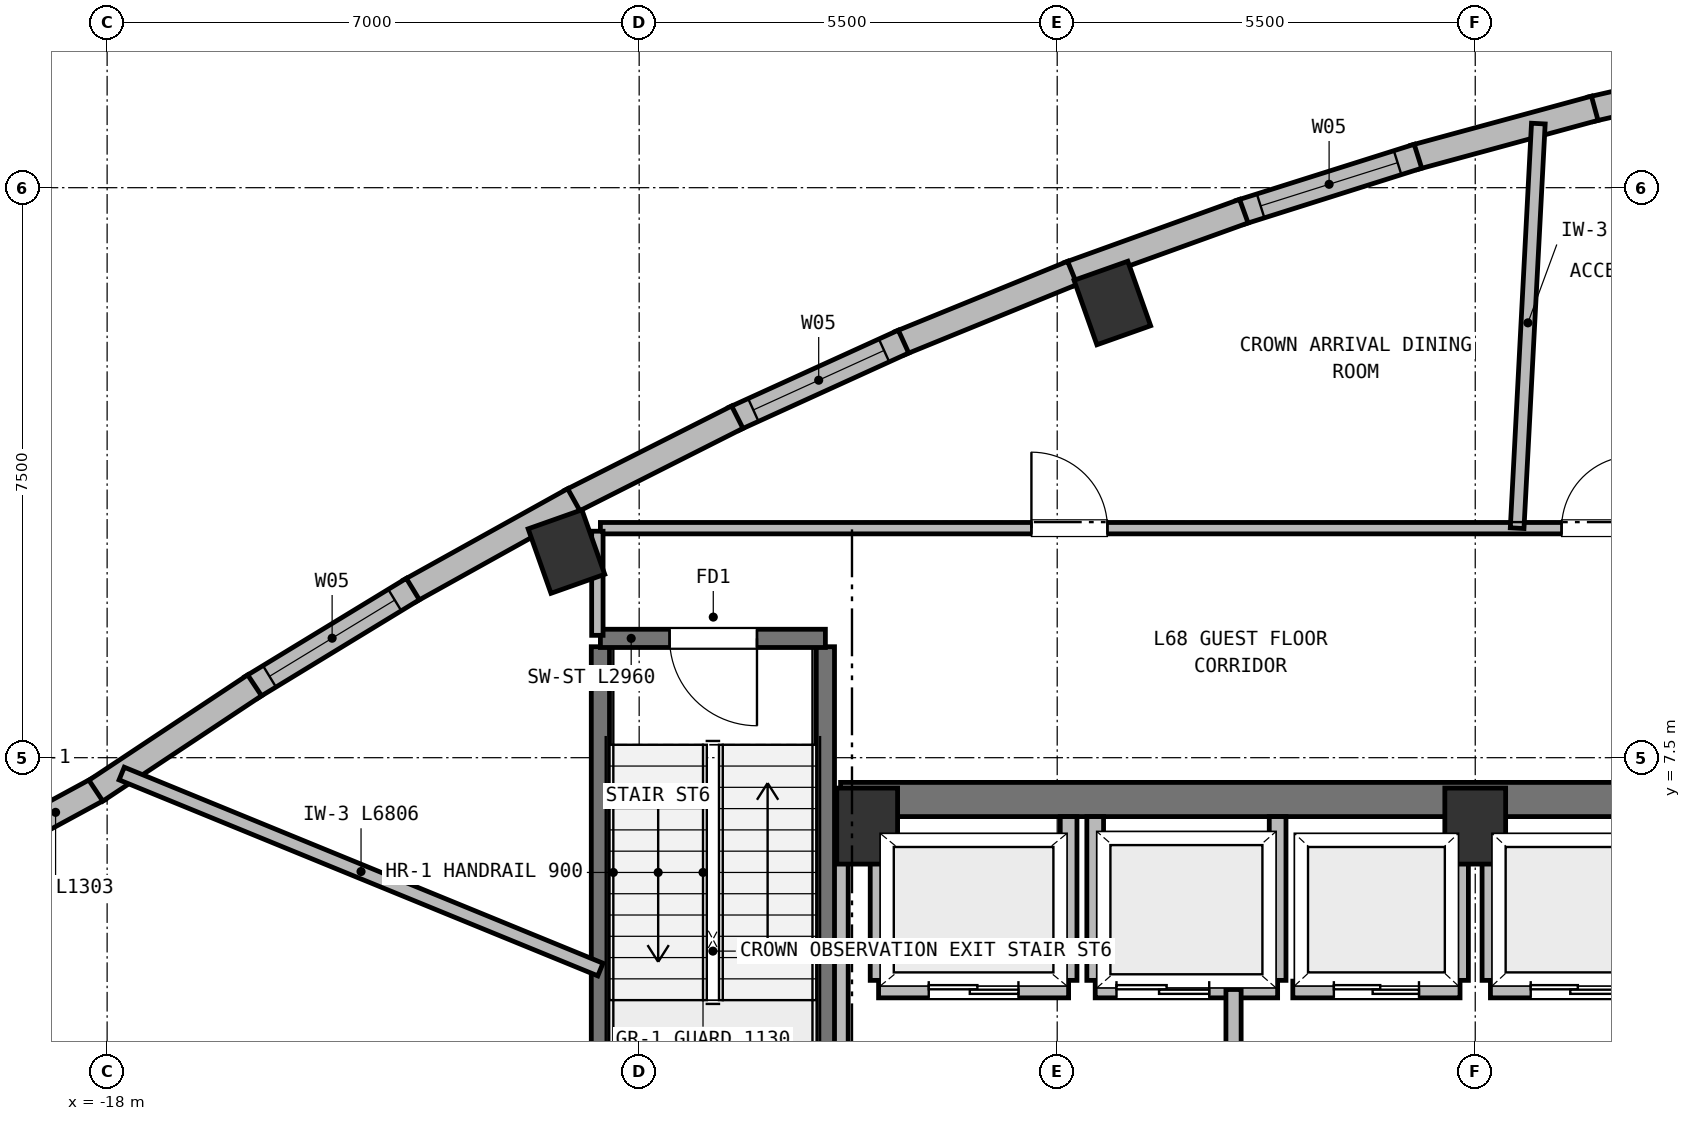
"""IFC4 building model, lengths in metres.
Left out: names, types, materials, properties, quantities, classifications, styles, units other than length and angle.
Written with IfcOpenShell. Run it as: python <this file> out.ifc"""

import sys

from ifc_helpers import new_model, si_unit, direction, frame, frame_2d, origin, origin_2d, place, context, subcontext, project, spatial, rectangle, extrude, element, fill, save


model = new_model("IFC4")
c1 = context("Model", 3, precision=1e-05, world=origin(), true_north=direction((0.0, 1.0)))
c2 = subcontext(c1, "Body", "Model", "MODEL_VIEW")
j1 = project(units=[si_unit("LENGTHUNIT", "METRE"), si_unit("PLANEANGLEUNIT", "RADIAN")], contexts=[c1])
p1 = place(None, origin())
s1 = spatial("IfcSite", under=j1, at=p1, CompositionType="ELEMENT")
p2 = place(p1, origin())
s2 = spatial("IfcBuilding", under=s1, at=p2, CompositionType="ELEMENT")
p3 = place(p2, frame((0.0, 0.0, 272.8)))
s3 = spatial("IfcBuildingStorey", under=s2, at=p3, CompositionType="ELEMENT", Elevation=272.8)
for number, where, z_axis, x_axis in (
    (1, (0.0, 6.6, 0.0), (0.0, 0.0, 1.0), (1.0, 0.0, 0.0)),
    (2, (-8.0, 6.6, 0.0), (0.0, 0.0, 1.0), (1.0, 0.0, 0.0)),
):
    element("IfcColumn", number, at=place(p3, frame(where, z_axis=z_axis, x_axis=x_axis)), inside=s3, PredefinedType="COLUMN", context=c2, shape_type="SweptSolid", body=[
        extrude(rectangle(XDim=0.8, YDim=1.0, at=origin_2d()), origin(), (0.0, 0.0, 1.0), 4.4),
    ])
p4 = place(p3, frame((-8.35, 6.95, 0.0), z_axis=(0.0, 0.0, 1.0), x_axis=(1.0, 0.0, 0.0)))
e3 = element("IfcWall", 3, at=p4, inside=s3, PredefinedType="SHEAR", context=c2, shape_type="SweptSolid", body=[
    extrude(rectangle(XDim=16.7, YDim=0.45, at=frame_2d((8.35, 0.0))), origin(), (0.0, 0.0, 1.0), 4.15),
])
for number, where, z_axis, x_axis in (
    (4, (-4.774, 13.483, 0.0), (0.0, 0.0, 1.0), (0.943, 0.334, 0.0)),
    (5, (-11.957, 10.212, 0.0), (0.0, 0.0, 1.0), (0.943, 0.334, 0.0)),
):
    element("IfcColumn", number, at=place(p3, frame(where, z_axis=z_axis, x_axis=x_axis)), inside=s3, PredefinedType="COLUMN", context=c2, shape_type="SweptSolid", body=[
        extrude(rectangle(XDim=0.75, YDim=0.9, at=origin_2d()), origin(), (0.0, 0.0, 1.0), 4.4),
    ])
p5 = place(p3, frame((-19.25, 6.47, 0.0), z_axis=(0.0, 0.0, 1.0), x_axis=(0.878774855812, 0.477236579478, 0.0)))
e6 = element("IfcWall", 6, at=p5, inside=s3, PredefinedType="SOLIDWALL", context=c2, shape_type="SweptSolid", body=[
    extrude(rectangle(XDim=1.303, YDim=0.33, at=frame_2d((0.651, 0.0))), origin(), (0.0, 0.0, 1.0), 4.15),
])
p6 = place(p3, frame((1.524, 16.033, 0.0), z_axis=(0.0, 0.0, 1.0), x_axis=(0.974681670362, 0.223597051545, 0.0)))
e7 = element("IfcWall", 7, at=p6, inside=s3, PredefinedType="SOLIDWALL", context=c2, shape_type="SweptSolid", body=[
    extrude(rectangle(XDim=2.472, YDim=0.33, at=frame_2d((1.236, 0.0))), origin(), (0.0, 0.0, 1.0), 4.15),
])
p7 = place(p3, frame((-0.802, 15.399, 0.0), z_axis=(0.0, 0.0, 1.0), x_axis=(0.964933096461, 0.262495941596, 0.0)))
e8 = element("IfcWall", 8, at=p7, inside=s3, PredefinedType="SOLIDWALL", context=c2, shape_type="SweptSolid", body=[
    extrude(rectangle(XDim=2.46, YDim=0.33, at=frame_2d((1.23, 0.0))), origin(), (0.0, 0.0, 1.0), 4.15),
])
p8 = place(p3, frame((-3.092, 14.676, 0.0), z_axis=(0.0, 0.0, 1.0), x_axis=(0.953629301066, 0.300983647643, 0.0)))
e9 = element("IfcWall", 9, at=p8, inside=s3, PredefinedType="SOLIDWALL", context=c2, shape_type="SweptSolid", body=[
    extrude(rectangle(XDim=2.452, YDim=0.33, at=frame_2d((1.226, 0.0))), origin(), (0.0, 0.0, 1.0), 4.15),
])
p9 = place(p8, frame((0.281, 0.0, 0.72)))
e10 = element("IfcOpeningElement", 10, at=p9, cuts=e9, PredefinedType="OPENING", context=c2, shape_type="SweptSolid", body=[
    extrude(rectangle(XDim=1.89, YDim=2.15, at=frame_2d((0.945, 1.075))), frame((0.0, 0.175, 0.0), z_axis=(0.0, -1.0, 0.0), x_axis=(1.0, 0.0, 0.0)), (0.0, 0.0, 1.0), 0.35),
])
for number, where, z_axis, x_axis in (
    (11, (-5.347, 13.861, 0.0), (0.0, 0.0, 1.0), (0.941, 0.339, 0.0)),
    (12, (-7.568, 12.955, 0.0), (0.0, 0.0, 1.0), (0.926, 0.377, 0.0)),
):
    element("IfcWall", number, at=place(p3, frame(where, z_axis=z_axis, x_axis=x_axis)), inside=s3, PredefinedType="SOLIDWALL", context=c2, shape_type="SweptSolid", body=[
        extrude(rectangle(XDim=2.448, YDim=0.33, at=frame_2d((1.224, 0.0))), origin(), (0.0, 0.0, 1.0), 4.15),
    ])
p10 = place(p3, frame((-9.754, 11.959, 0.0), z_axis=(0.0, 0.0, 1.0), x_axis=(0.910103748432, 0.414380461763, 0.0)))
e13 = element("IfcWall", 13, at=p10, inside=s3, PredefinedType="SOLIDWALL", context=c2, shape_type="SweptSolid", body=[
    extrude(rectangle(XDim=2.452, YDim=0.33, at=frame_2d((1.226, 0.0))), origin(), (0.0, 0.0, 1.0), 4.15),
])
p11 = place(p10, frame((0.281, 0.0, 0.72)))
e14 = element("IfcOpeningElement", 14, at=p11, cuts=e13, PredefinedType="OPENING", context=c2, shape_type="SweptSolid", body=[
    extrude(rectangle(XDim=1.89, YDim=2.15, at=frame_2d((0.945, 1.075))), frame((0.0, 0.175, 0.0), z_axis=(0.0, -1.0, 0.0), x_axis=(1.0, 0.0, 0.0)), (0.0, 0.0, 1.0), 0.35),
])
p12 = place(p3, frame((-11.905, 10.872, 0.0), z_axis=(0.0, 0.0, 1.0), x_axis=(0.892653761516, 0.450743011096, 0.0)))
e15 = element("IfcWall", 15, at=p12, inside=s3, PredefinedType="SOLIDWALL", context=c2, shape_type="SweptSolid", body=[
    extrude(rectangle(XDim=2.46, YDim=0.33, at=frame_2d((1.23, 0.0))), origin(), (0.0, 0.0, 1.0), 4.15),
])
p13 = place(p3, frame((-14.021, 9.694, 0.0), z_axis=(0.0, 0.0, 1.0), x_axis=(0.873970841772, 0.485978361383, 0.0)))
e16 = element("IfcWall", 16, at=p13, inside=s3, PredefinedType="SOLIDWALL", context=c2, shape_type="SweptSolid", body=[
    extrude(rectangle(XDim=2.472, YDim=0.33, at=frame_2d((1.236, 0.0))), origin(), (0.0, 0.0, 1.0), 4.15),
])
p14 = place(p3, frame((-16.102, 8.425, 0.0), z_axis=(0.0, 0.0, 1.0), x_axis=(0.854079117913, 0.520143115253, 0.0)))
e17 = element("IfcWall", 17, at=p14, inside=s3, PredefinedType="SOLIDWALL", context=c2, shape_type="SweptSolid", body=[
    extrude(rectangle(XDim=2.487, YDim=0.33, at=frame_2d((1.244, 0.0))), origin(), (0.0, 0.0, 1.0), 4.15),
])
p15 = place(p14, frame((0.279, 0.0, 0.72)))
e18 = element("IfcOpeningElement", 18, at=p15, cuts=e17, PredefinedType="OPENING", context=c2, shape_type="SweptSolid", body=[
    extrude(rectangle(XDim=1.93, YDim=2.15, at=frame_2d((0.965, 1.075))), frame((0.0, 0.175, 0.0), z_axis=(0.0, -1.0, 0.0), x_axis=(1.0, 0.0, 0.0)), (0.0, 0.0, 1.0), 0.35),
])
p16 = place(p3, frame((-18.148, 7.066, 0.0), z_axis=(0.0, 0.0, 1.0), x_axis=(0.833157490591, 0.55303579981, 0.0)))
e19 = element("IfcWall", 19, at=p16, inside=s3, PredefinedType="SOLIDWALL", context=c2, shape_type="SweptSolid", body=[
    extrude(rectangle(XDim=2.507, YDim=0.33, at=frame_2d((1.253, 0.0))), origin(), (0.0, 0.0, 1.0), 4.15),
])
p17 = place(p3, frame((-7.85, 4.45, 0.0), z_axis=(0.0, 0.0, 1.0), x_axis=(1.0, 0.0, 0.0)))
e20 = element("IfcWall", 20, at=p17, inside=s3, PredefinedType="PARTITIONING", context=c2, shape_type="SweptSolid", body=[
    extrude(rectangle(XDim=2.5, YDim=0.22, at=frame_2d((1.25, 0.0))), origin(), (0.0, 0.0, 1.0), 4.15),
])
p18 = place(p17, frame((0.66, 0.0, 0.0)))
e21 = element("IfcOpeningElement", 21, at=p18, cuts=e20, PredefinedType="OPENING", context=c2, shape_type="SweptSolid", body=[
    extrude(rectangle(XDim=1.18, YDim=2.15, at=frame_2d((0.59, 1.075))), frame((0.0, 0.12, 0.0), z_axis=(0.0, -1.0, 0.0), x_axis=(1.0, 0.0, 0.0)), (0.0, 0.0, 1.0), 0.24),
])
p19 = place(p3, frame((-7.85, 4.57, 0.0), z_axis=(0.0, 0.0, 1.0), x_axis=(0.0, 1.0, 0.0)))
e22 = element("IfcWall", 22, at=p19, inside=s3, PredefinedType="PARTITIONING", context=c2, shape_type="SweptSolid", body=[
    extrude(rectangle(XDim=2.155, YDim=0.22, at=frame_2d((1.078, 0.0))), origin(), (0.0, 0.0, 1.0), 3.83),
])
p20 = place(p3, frame((-5.35, 4.57, 0.0), z_axis=(0.0, 0.0, 1.0), x_axis=(0.0, 1.0, 0.0)))
e23 = element("IfcWall", 23, at=p20, inside=s3, PredefinedType="PARTITIONING", context=c2, shape_type="SweptSolid", body=[
    extrude(rectangle(XDim=2.155, YDim=0.22, at=frame_2d((1.078, 0.0))), origin(), (0.0, 0.0, 1.0), 4.15),
])
p21 = place(p3, frame((-5.0, 4.45, 0.0), z_axis=(0.0, 0.0, 1.0), x_axis=(1.0, 0.0, 0.0)))
e24 = element("IfcWall", 24, at=p21, inside=s3, PredefinedType="PARTITIONING", context=c2, shape_type="SweptSolid", body=[
    extrude(rectangle(XDim=2.4, YDim=0.22, at=frame_2d((1.2, 0.0))), origin(), (0.0, 0.0, 1.0), 4.15),
])
p22 = place(p21, frame((0.28, 0.0, 0.0)))
e25 = element("IfcOpeningElement", 25, at=p22, cuts=e24, PredefinedType="OPENING", context=c2, shape_type="SweptSolid", body=[
    extrude(rectangle(XDim=1.22, YDim=2.15, at=frame_2d((0.61, 1.075))), frame((0.0, 0.12, 0.0), z_axis=(0.0, -1.0, 0.0), x_axis=(1.0, 0.0, 0.0)), (0.0, 0.0, 1.0), 0.24),
])
for number, where, z_axis, x_axis in (
    (26, (-5.0, 4.57, 0.0), (0.0, 0.0, 1.0), (0.0, 1.0, 0.0)),
    (27, (-2.6, 4.57, 0.0), (0.0, 0.0, 1.0), (0.0, 1.0, 0.0)),
):
    element("IfcWall", number, at=place(p3, frame(where, z_axis=z_axis, x_axis=x_axis)), inside=s3, PredefinedType="PARTITIONING", context=c2, shape_type="SweptSolid", body=[
        extrude(rectangle(XDim=2.155, YDim=0.22, at=frame_2d((1.078, 0.0))), origin(), (0.0, 0.0, 1.0), 4.15),
    ])
p23 = place(p3, frame((-2.4, 4.45, 0.0), z_axis=(0.0, 0.0, 1.0), x_axis=(1.0, 0.0, 0.0)))
e28 = element("IfcWall", 28, at=p23, inside=s3, PredefinedType="PARTITIONING", context=c2, shape_type="SweptSolid", body=[
    extrude(rectangle(XDim=2.2, YDim=0.22, at=frame_2d((1.1, 0.0))), origin(), (0.0, 0.0, 1.0), 4.15),
])
p24 = place(p23, frame((0.54, 0.0, 0.0)))
e29 = element("IfcOpeningElement", 29, at=p24, cuts=e28, PredefinedType="OPENING", context=c2, shape_type="SweptSolid", body=[
    extrude(rectangle(XDim=1.12, YDim=2.15, at=frame_2d((0.56, 1.075))), frame((0.0, 0.12, 0.0), z_axis=(0.0, -1.0, 0.0), x_axis=(1.0, 0.0, 0.0)), (0.0, 0.0, 1.0), 0.24),
])
p25 = place(p3, frame((-0.2, 4.57, 0.0), z_axis=(0.0, 0.0, 1.0), x_axis=(0.0, 1.0, 0.0)))
e30 = element("IfcWall", 30, at=p25, inside=s3, PredefinedType="PARTITIONING", context=c2, shape_type="SweptSolid", body=[
    extrude(rectangle(XDim=2.155, YDim=0.22, at=frame_2d((1.078, 0.0))), origin(), (0.0, 0.0, 1.0), 4.15),
])
p26 = place(p3, frame((0.2, 4.45, 0.0), z_axis=(0.0, 0.0, 1.0), x_axis=(1.0, 0.0, 0.0)))
e31 = element("IfcWall", 31, at=p26, inside=s3, PredefinedType="PARTITIONING", context=c2, shape_type="SweptSolid", body=[
    extrude(rectangle(XDim=2.2, YDim=0.22, at=frame_2d((1.1, 0.0))), origin(), (0.0, 0.0, 1.0), 4.15),
])
p27 = place(p26, frame((0.53, 0.0, 0.0)))
e32 = element("IfcOpeningElement", 32, at=p27, cuts=e31, PredefinedType="OPENING", context=c2, shape_type="SweptSolid", body=[
    extrude(rectangle(XDim=1.14, YDim=2.15, at=frame_2d((0.57, 1.075))), frame((0.0, 0.12, 0.0), z_axis=(0.0, -1.0, 0.0), x_axis=(1.0, 0.0, 0.0)), (0.0, 0.0, 1.0), 0.24),
])
p28 = place(p3, frame((0.2, 4.57, 0.0), z_axis=(0.0, 0.0, 1.0), x_axis=(0.0, 1.0, 0.0)))
e33 = element("IfcWall", 33, at=p28, inside=s3, PredefinedType="PARTITIONING", context=c2, shape_type="SweptSolid", body=[
    extrude(rectangle(XDim=2.155, YDim=0.22, at=frame_2d((1.078, 0.0))), origin(), (0.0, 0.0, 1.0), 4.15),
])
p29 = place(p3, frame((-3.18, 1.15, 0.0), z_axis=(0.0, 0.0, 1.0), x_axis=(0.0, 1.0, 0.0)))
e34 = element("IfcWall", 34, at=p29, inside=s3, PredefinedType="PARTITIONING", context=c2, shape_type="SweptSolid", body=[
    extrude(rectangle(XDim=3.3, YDim=0.2, at=frame_2d((1.65, 0.0))), origin(), (0.0, 0.0, 1.0), 4.15),
])
p30 = place(p29, frame((1.08, 0.0, 0.0)))
e35 = element("IfcOpeningElement", 35, at=p30, cuts=e34, PredefinedType="OPENING", context=c2, shape_type="SweptSolid", body=[
    extrude(rectangle(XDim=1.15, YDim=2.15, at=frame_2d((0.575, 1.075))), frame((0.0, 0.11, 0.0), z_axis=(0.0, -1.0, 0.0), x_axis=(1.0, 0.0, 0.0)), (0.0, 0.0, 1.0), 0.22),
])
p31 = place(p3, frame((-8.35, 1.15, 0.0), z_axis=(0.0, 0.0, 1.0), x_axis=(0.0, 1.0, 0.0)))
e36 = element("IfcWall", 36, at=p31, inside=s3, PredefinedType="PARTITIONING", context=c2, shape_type="SweptSolid", body=[
    extrude(rectangle(XDim=5.4, YDim=0.2, at=frame_2d((2.7, 0.0))), origin(), (0.0, 0.0, 1.0), 4.15),
])
p32 = place(p31, frame((0.06, 0.0, 0.0)))
e37 = element("IfcOpeningElement", 37, at=p32, cuts=e36, PredefinedType="OPENING", context=c2, shape_type="SweptSolid", body=[
    extrude(rectangle(XDim=1.15, YDim=2.15, at=frame_2d((0.575, 1.075))), frame((0.0, 0.11, 0.0), z_axis=(0.0, -1.0, 0.0), x_axis=(1.0, 0.0, 0.0)), (0.0, 0.0, 1.0), 0.22),
])
for number, where, z_axis, x_axis in (
    (38, (-11.51, 2.54, 0.0), (0.0, 0.0, 1.0), (0.0, 1.0, 0.0)),
    (39, (-8.55, 2.54, 0.0), (0.0, 0.0, 1.0), (0.0, 1.0, 0.0)),
):
    element("IfcWall", number, at=place(p3, frame(where, z_axis=z_axis, x_axis=x_axis)), inside=s3, PredefinedType="SHEAR", context=c2, shape_type="SweptSolid", body=[
        extrude(rectangle(XDim=6.42, YDim=0.24, at=frame_2d((3.21, 0.0))), origin(), (0.0, 0.0, 1.0), 4.15),
    ])
p33 = place(p3, frame((-8.55, 9.07, 0.0), z_axis=(0.0, 0.0, 1.0), x_axis=(-1.0, 0.0, 0.0)))
e40 = element("IfcWall", 40, at=p33, inside=s3, PredefinedType="SHEAR", context=c2, shape_type="SweptSolid", body=[
    extrude(rectangle(XDim=2.96, YDim=0.24, at=frame_2d((1.48, 0.0))), origin(), (0.0, 0.0, 1.0), 4.15),
])
p34 = place(p33, frame((0.9, 0.0, 0.0)))
e41 = element("IfcOpeningElement", 41, at=p34, cuts=e40, PredefinedType="OPENING", context=c2, shape_type="SweptSolid", body=[
    extrude(rectangle(XDim=1.15, YDim=2.15, at=frame_2d((0.575, 1.075))), frame((0.0, 0.13, 0.0), z_axis=(0.0, -1.0, 0.0), x_axis=(1.0, 0.0, 0.0)), (0.0, 0.0, 1.0), 0.26),
])
p35 = place(p3, frame((-11.51, 10.52, 0.0), z_axis=(0.0, 0.0, 1.0), x_axis=(1.0, 0.0, 0.0)))
e42 = element("IfcWall", 42, at=p35, inside=s3, PredefinedType="PARTITIONING", context=c2, shape_type="SweptSolid", body=[
    extrude(rectangle(XDim=20.09, YDim=0.15, at=frame_2d((10.045, 0.0))), origin(), (0.0, 0.0, 1.0), 4.15),
])
p36 = place(p35, frame((12.646, 0.0, 0.0)))
e43 = element("IfcOpeningElement", 43, at=p36, cuts=e42, PredefinedType="OPENING", context=c2, shape_type="SweptSolid", body=[
    extrude(rectangle(XDim=0.95, YDim=2.1, at=frame_2d((0.475, 1.05))), frame((0.0, 0.085, 0.0), z_axis=(0.0, -1.0, 0.0), x_axis=(1.0, 0.0, 0.0)), (0.0, 0.0, 1.0), 0.17),
])
p37 = place(p35, frame((14.763, 0.0, 0.0)))
e44 = element("IfcOpeningElement", 44, at=p37, cuts=e42, PredefinedType="OPENING", context=c2, shape_type="SweptSolid", body=[
    extrude(rectangle(XDim=0.95, YDim=2.1, at=frame_2d((0.475, 1.05))), frame((0.0, 0.085, 0.0), z_axis=(0.0, -1.0, 0.0), x_axis=(1.0, 0.0, 0.0)), (0.0, 0.0, 1.0), 0.17),
])
p38 = place(p35, frame((16.895, 0.0, 0.0)))
e45 = element("IfcOpeningElement", 45, at=p38, cuts=e42, PredefinedType="OPENING", context=c2, shape_type="SweptSolid", body=[
    extrude(rectangle(XDim=0.95, YDim=2.1, at=frame_2d((0.475, 1.05))), frame((0.0, 0.085, 0.0), z_axis=(0.0, -1.0, 0.0), x_axis=(1.0, 0.0, 0.0)), (0.0, 0.0, 1.0), 0.17),
])
p39 = place(p35, frame((5.671, 0.0, 0.0)))
e46 = element("IfcOpeningElement", 46, at=p39, cuts=e42, PredefinedType="OPENING", context=c2, shape_type="SweptSolid", body=[
    extrude(rectangle(XDim=1.0, YDim=2.15, at=frame_2d((0.5, 1.075))), frame((0.0, 0.085, 0.0), z_axis=(0.0, -1.0, 0.0), x_axis=(1.0, 0.0, 0.0)), (0.0, 0.0, 1.0), 0.17),
])
p40 = place(p3, frame((-11.55, 9.11, 0.0), z_axis=(0.0, 0.0, 1.0), x_axis=(0.0, 1.0, 0.0)))
e47 = element("IfcWall", 47, at=p40, inside=s3, PredefinedType="PARTITIONING", context=c2, shape_type="SweptSolid", body=[
    extrude(rectangle(XDim=1.37, YDim=0.15, at=frame_2d((0.685, 0.0))), origin(), (0.0, 0.0, 1.0), 4.15),
])
p41 = place(p3, frame((0.551, 10.52, 0.0), z_axis=(0.0, 0.0, 1.0), x_axis=(0.05234969433, 0.998628814677, 0.0)))
e48 = element("IfcWall", 48, at=p41, inside=s3, PredefinedType="PARTITIONING", context=c2, shape_type="SweptSolid", body=[
    extrude(rectangle(XDim=5.331, YDim=0.18, at=frame_2d((2.665, 0.0))), origin(), (0.0, 0.0, 1.0), 4.15),
])
p42 = place(p3, frame((-11.51, 4.712, 0.0), z_axis=(0.0, 0.0, 1.0), x_axis=(-0.925422915291, 0.378935915234, 0.0)))
e49 = element("IfcWall", 49, at=p42, inside=s3, PredefinedType="PARTITIONING", context=c2, shape_type="SweptSolid", body=[
    extrude(rectangle(XDim=6.806, YDim=0.18, at=frame_2d((3.403, 0.0))), origin(), (0.0, 0.0, 1.0), 4.15),
])
p43 = place(p9, origin())
e50 = element("IfcWindow", 50, at=p43, inside=s3, PartitioningType="SINGLE_PANEL", PredefinedType="WINDOW", context=c2, shape_type="SweptSolid", body=[
    extrude(rectangle(XDim=1.89, YDim=2.15, at=frame_2d((0.945, 1.075))), frame((0.0, 0.03, 0.0), z_axis=(0.0, -1.0, 0.0), x_axis=(1.0, 0.0, 0.0)), (0.0, 0.0, 1.0), 0.06),
])
fill(e10, e50)
p44 = place(p11, origin())
e51 = element("IfcWindow", 51, at=p44, inside=s3, PartitioningType="SINGLE_PANEL", PredefinedType="WINDOW", context=c2, shape_type="SweptSolid", body=[
    extrude(rectangle(XDim=1.89, YDim=2.15, at=frame_2d((0.945, 1.075))), frame((0.0, 0.03, 0.0), z_axis=(0.0, -1.0, 0.0), x_axis=(1.0, 0.0, 0.0)), (0.0, 0.0, 1.0), 0.06),
])
fill(e14, e51)
p45 = place(p15, origin())
e52 = element("IfcWindow", 52, at=p45, inside=s3, PartitioningType="SINGLE_PANEL", PredefinedType="WINDOW", context=c2, shape_type="SweptSolid", body=[
    extrude(rectangle(XDim=1.93, YDim=2.15, at=frame_2d((0.965, 1.075))), frame((0.0, 0.03, 0.0), z_axis=(0.0, -1.0, 0.0), x_axis=(1.0, 0.0, 0.0)), (0.0, 0.0, 1.0), 0.06),
])
fill(e18, e52)
p46 = place(p18, origin())
e53 = element("IfcDoor", 53, at=p46, inside=s3, OperationType="DOUBLE_DOOR_SLIDING", PredefinedType="DOOR", context=c2, shape_type="SweptSolid", body=[
    extrude(rectangle(XDim=1.18, YDim=2.15, at=frame_2d((0.59, 1.075))), frame((0.0, 0.025, 0.0), z_axis=(0.0, -1.0, 0.0), x_axis=(1.0, 0.0, 0.0)), (0.0, 0.0, 1.0), 0.05),
])
fill(e21, e53)
p47 = place(p22, origin())
e54 = element("IfcDoor", 54, at=p47, inside=s3, OperationType="DOUBLE_DOOR_SLIDING", PredefinedType="DOOR", context=c2, shape_type="SweptSolid", body=[
    extrude(rectangle(XDim=1.22, YDim=2.15, at=frame_2d((0.61, 1.075))), frame((0.0, 0.025, 0.0), z_axis=(0.0, -1.0, 0.0), x_axis=(1.0, 0.0, 0.0)), (0.0, 0.0, 1.0), 0.05),
])
fill(e25, e54)
p48 = place(p24, origin())
e55 = element("IfcDoor", 55, at=p48, inside=s3, OperationType="DOUBLE_DOOR_SLIDING", PredefinedType="DOOR", context=c2, shape_type="SweptSolid", body=[
    extrude(rectangle(XDim=1.12, YDim=2.15, at=frame_2d((0.56, 1.075))), frame((0.0, 0.025, 0.0), z_axis=(0.0, -1.0, 0.0), x_axis=(1.0, 0.0, 0.0)), (0.0, 0.0, 1.0), 0.05),
])
fill(e29, e55)
p49 = place(p27, origin())
e56 = element("IfcDoor", 56, at=p49, inside=s3, OperationType="DOUBLE_DOOR_SLIDING", PredefinedType="DOOR", context=c2, shape_type="SweptSolid", body=[
    extrude(rectangle(XDim=1.14, YDim=2.15, at=frame_2d((0.57, 1.075))), frame((0.0, 0.025, 0.0), z_axis=(0.0, -1.0, 0.0), x_axis=(1.0, 0.0, 0.0)), (0.0, 0.0, 1.0), 0.05),
])
fill(e32, e56)
p50 = place(p34, origin())
e57 = element("IfcDoor", 57, at=p50, inside=s3, OperationType="SINGLE_SWING_LEFT", PredefinedType="DOOR", context=c2, shape_type="SweptSolid", body=[
    extrude(rectangle(XDim=1.15, YDim=2.15, at=frame_2d((0.575, 1.075))), frame((0.0, 0.025, 0.0), z_axis=(0.0, -1.0, 0.0), x_axis=(1.0, 0.0, 0.0)), (0.0, 0.0, 1.0), 0.05),
])
fill(e41, e57)
p51 = place(p36, origin())
e58 = element("IfcDoor", 58, at=p51, inside=s3, OperationType="SINGLE_SWING_RIGHT", PredefinedType="DOOR", context=c2, shape_type="SweptSolid", body=[
    extrude(rectangle(XDim=0.95, YDim=2.1, at=frame_2d((0.475, 1.05))), frame((0.0, 0.025, 0.0), z_axis=(0.0, -1.0, 0.0), x_axis=(1.0, 0.0, 0.0)), (0.0, 0.0, 1.0), 0.05),
])
fill(e43, e58)
p52 = place(p39, origin())
e59 = element("IfcDoor", 59, at=p52, inside=s3, OperationType="SINGLE_SWING_LEFT", PredefinedType="DOOR", context=c2, shape_type="SweptSolid", body=[
    extrude(rectangle(XDim=1.0, YDim=2.15, at=frame_2d((0.5, 1.075))), frame((0.0, 0.025, 0.0), z_axis=(0.0, -1.0, 0.0), x_axis=(1.0, 0.0, 0.0)), (0.0, 0.0, 1.0), 0.05),
])
fill(e46, e59)
save(model, sys.argv[1])
